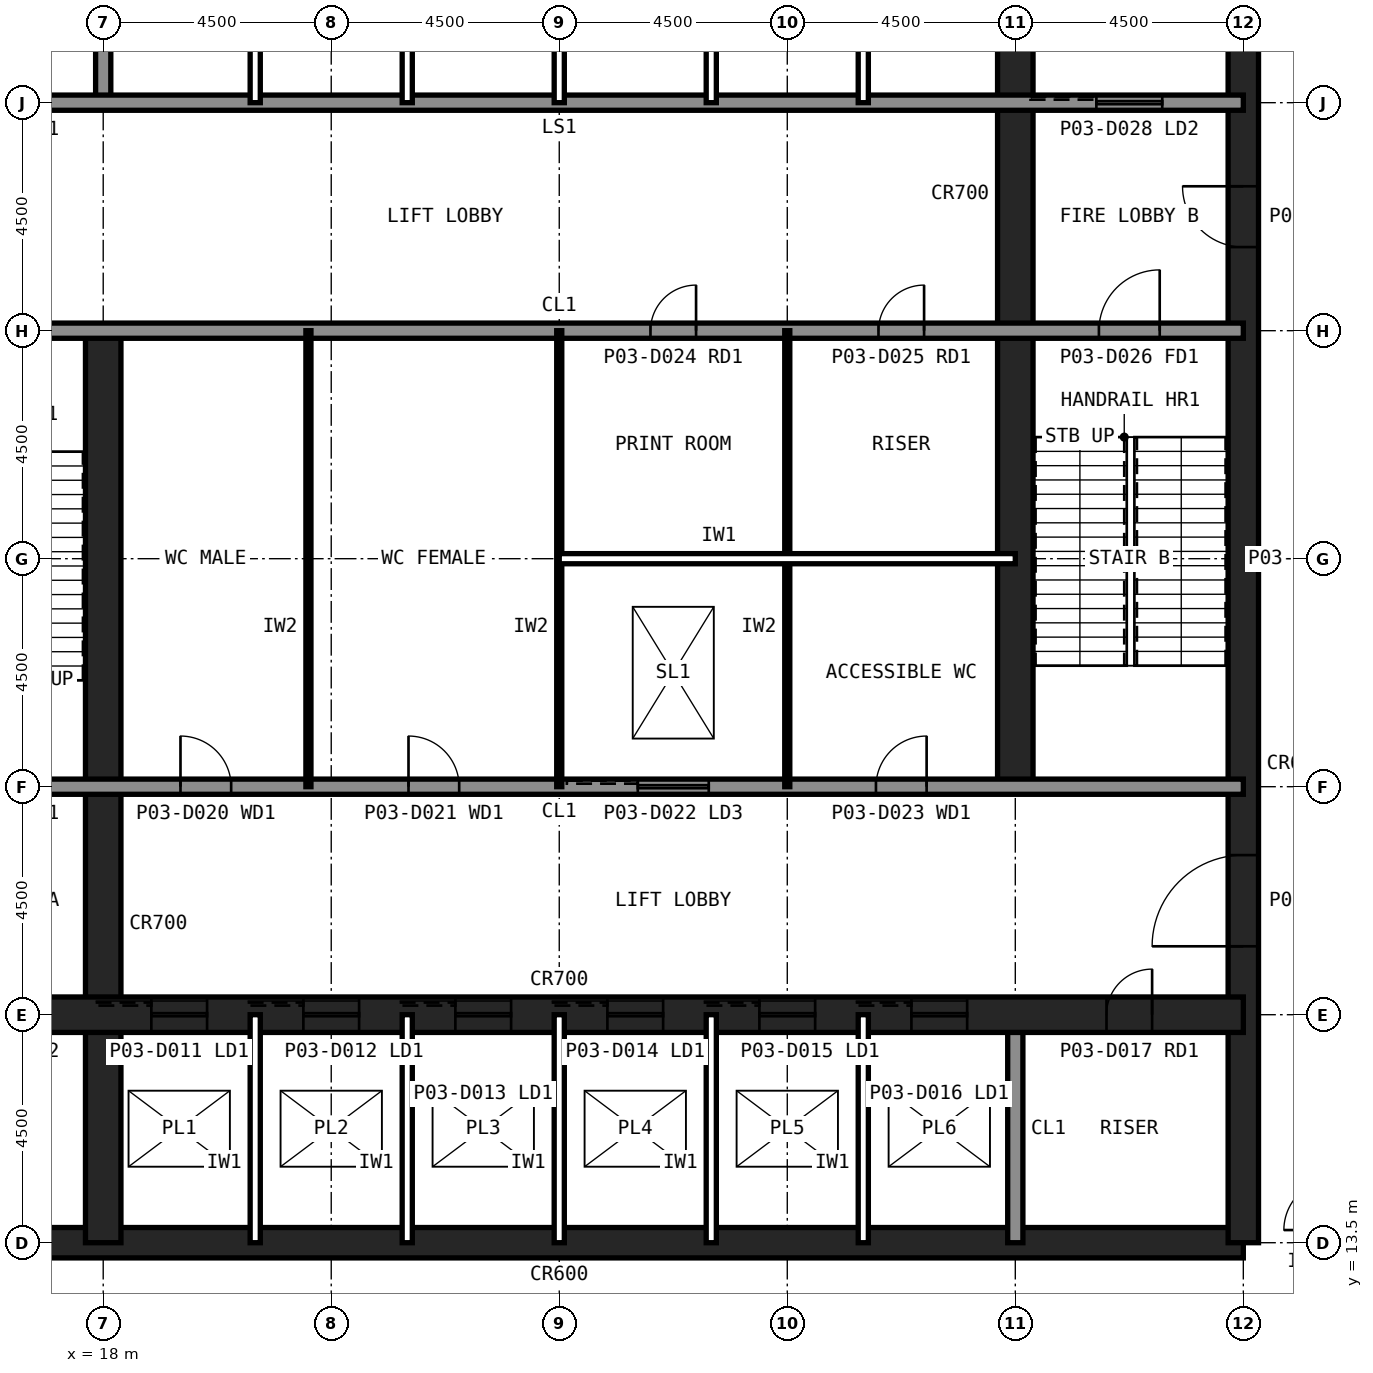
"""IFC4 building model, lengths in metres.
Left out: names, types, materials, properties, quantities, classifications, styles, units other than length and angle.
Written with IfcOpenShell. Run it as: python <this file> out.ifc"""

import sys

from ifc_helpers import new_model, si_unit, direction, frame, frame_2d, origin, place, context, subcontext, project, spatial, rectangle, extrude, element, fill, save


model = new_model("IFC4")
c1 = context("Model", 3, precision=1e-05, world=origin(), true_north=direction((0.0, 1.0)))
c2 = subcontext(c1, "Body", "Model", "MODEL_VIEW")
j1 = project(units=[si_unit("LENGTHUNIT", "METRE"), si_unit("PLANEANGLEUNIT", "RADIAN")], contexts=[c1])
p1 = place(None, origin())
s1 = spatial("IfcSite", under=j1, at=p1, CompositionType="ELEMENT")
p2 = place(p1, origin())
s2 = spatial("IfcBuilding", under=s1, at=p2, CompositionType="ELEMENT")
p3 = place(p2, frame((0.0, 0.0, 12.0)))
s3 = spatial("IfcBuildingStorey", under=s2, at=p3, CompositionType="ELEMENT", Elevation=12.0)
p4 = place(p3, frame((13.5, 13.5, 0.0), z_axis=(0.0, 0.0, 1.0), x_axis=(1.0, 0.0, 0.0)))
e1 = element("IfcWall", 1, at=p4, inside=s3, PredefinedType="SHEAR", context=c2, shape_type="SweptSolid", body=[
    extrude(rectangle(XDim=27.0, YDim=0.6, at=frame_2d((13.5, 0.0))), origin(), (0.0, 0.0, 1.0), 6.0),
])
p5 = place(p3, frame((40.5, 13.5, 0.0), z_axis=(0.0, 0.0, 1.0), x_axis=(0.0, 1.0, 0.0)))
e2 = element("IfcWall", 2, at=p5, inside=s3, PredefinedType="SHEAR", context=c2, shape_type="SweptSolid", body=[
    extrude(rectangle(XDim=27.0, YDim=0.6, at=frame_2d((13.5, 0.0))), origin(), (0.0, 0.0, 1.0), 6.0),
])
p6 = place(p5, frame((5.85, 0.0, 0.0)))
e3 = element("IfcOpeningElement", 3, at=p6, cuts=e2, PredefinedType="OPENING", context=c2, shape_type="SweptSolid", body=[
    extrude(rectangle(XDim=1.8, YDim=2.1, at=frame_2d((0.9, 1.05))), frame((0.0, 0.31, 0.0), z_axis=(0.0, -1.0, 0.0), x_axis=(1.0, 0.0, 0.0)), (0.0, 0.0, 1.0), 0.62),
])
p7 = place(p5, frame((19.65, 0.0, 0.0)))
e4 = element("IfcOpeningElement", 4, at=p7, cuts=e2, PredefinedType="OPENING", context=c2, shape_type="SweptSolid", body=[
    extrude(rectangle(XDim=1.2, YDim=2.1, at=frame_2d((0.6, 1.05))), frame((0.0, 0.31, 0.0), z_axis=(0.0, -1.0, 0.0), x_axis=(1.0, 0.0, 0.0)), (0.0, 0.0, 1.0), 0.62),
])
p8 = place(p3, frame((18.0, 13.5, 0.0), z_axis=(0.0, 0.0, 1.0), x_axis=(0.0, 1.0, 0.0)))
e5 = element("IfcWall", 5, at=p8, inside=s3, PredefinedType="SHEAR", context=c2, shape_type="SweptSolid", body=[
    extrude(rectangle(XDim=18.0, YDim=0.7, at=frame_2d((9.0, 0.0))), origin(), (0.0, 0.0, 1.0), 6.0),
])
for number, where, z_axis, x_axis in (
    (6, (18.0, 36.0, 0.0), (0.0, 0.0, 1.0), (0.0, 1.0, 0.0)),
    (7, (36.0, 13.5, 0.0), (0.0, 0.0, 1.0), (0.0, 1.0, 0.0)),
):
    element("IfcWall", number, at=place(p3, frame(where, z_axis=z_axis, x_axis=x_axis)), inside=s3, PredefinedType="SOLIDWALL", context=c2, shape_type="SweptSolid", body=[
        extrude(rectangle(XDim=4.5, YDim=0.3, at=frame_2d((2.25, 0.0))), origin(), (0.0, 0.0, 1.0), 5.8),
    ])
p9 = place(p3, frame((36.0, 22.5, 0.0), z_axis=(0.0, 0.0, 1.0), x_axis=(0.0, 1.0, 0.0)))
e8 = element("IfcWall", 8, at=p9, inside=s3, PredefinedType="SHEAR", context=c2, shape_type="SweptSolid", body=[
    extrude(rectangle(XDim=18.0, YDim=0.7, at=frame_2d((9.0, 0.0))), origin(), (0.0, 0.0, 1.0), 6.0),
])
p10 = place(p3, frame((13.5, 18.0, 0.0), z_axis=(0.0, 0.0, 1.0), x_axis=(1.0, 0.0, 0.0)))
e9 = element("IfcWall", 9, at=p10, inside=s3, PredefinedType="SHEAR", context=c2, shape_type="SweptSolid", body=[
    extrude(rectangle(XDim=27.0, YDim=0.7, at=frame_2d((13.5, 0.0))), origin(), (0.0, 0.0, 1.0), 6.0),
])
p11 = place(p10, frame((24.3, 0.0, 0.0)))
e10 = element("IfcOpeningElement", 10, at=p11, cuts=e9, PredefinedType="OPENING", context=c2, shape_type="SweptSolid", body=[
    extrude(rectangle(XDim=0.9, YDim=2.1, at=frame_2d((0.45, 1.05))), frame((0.0, 0.36, 0.0), z_axis=(0.0, -1.0, 0.0), x_axis=(1.0, 0.0, 0.0)), (0.0, 0.0, 1.0), 0.72),
])
p12 = place(p10, frame((5.45, 0.0, 0.0)))
e11 = element("IfcOpeningElement", 11, at=p12, cuts=e9, PredefinedType="OPENING", context=c2, shape_type="SweptSolid", body=[
    extrude(rectangle(XDim=1.1, YDim=2.1, at=frame_2d((0.55, 1.05))), frame((0.0, 0.36, 0.0), z_axis=(0.0, -1.0, 0.0), x_axis=(1.0, 0.0, 0.0)), (0.0, 0.0, 1.0), 0.72),
])
p13 = place(p10, frame((8.45, 0.0, 0.0)))
e12 = element("IfcOpeningElement", 12, at=p13, cuts=e9, PredefinedType="OPENING", context=c2, shape_type="SweptSolid", body=[
    extrude(rectangle(XDim=1.1, YDim=2.1, at=frame_2d((0.55, 1.05))), frame((0.0, 0.36, 0.0), z_axis=(0.0, -1.0, 0.0), x_axis=(1.0, 0.0, 0.0)), (0.0, 0.0, 1.0), 0.72),
])
p14 = place(p10, frame((11.45, 0.0, 0.0)))
e13 = element("IfcOpeningElement", 13, at=p14, cuts=e9, PredefinedType="OPENING", context=c2, shape_type="SweptSolid", body=[
    extrude(rectangle(XDim=1.1, YDim=2.1, at=frame_2d((0.55, 1.05))), frame((0.0, 0.36, 0.0), z_axis=(0.0, -1.0, 0.0), x_axis=(1.0, 0.0, 0.0)), (0.0, 0.0, 1.0), 0.72),
])
p15 = place(p10, frame((14.45, 0.0, 0.0)))
e14 = element("IfcOpeningElement", 14, at=p15, cuts=e9, PredefinedType="OPENING", context=c2, shape_type="SweptSolid", body=[
    extrude(rectangle(XDim=1.1, YDim=2.1, at=frame_2d((0.55, 1.05))), frame((0.0, 0.36, 0.0), z_axis=(0.0, -1.0, 0.0), x_axis=(1.0, 0.0, 0.0)), (0.0, 0.0, 1.0), 0.72),
])
p16 = place(p10, frame((17.45, 0.0, 0.0)))
e15 = element("IfcOpeningElement", 15, at=p16, cuts=e9, PredefinedType="OPENING", context=c2, shape_type="SweptSolid", body=[
    extrude(rectangle(XDim=1.1, YDim=2.1, at=frame_2d((0.55, 1.05))), frame((0.0, 0.36, 0.0), z_axis=(0.0, -1.0, 0.0), x_axis=(1.0, 0.0, 0.0)), (0.0, 0.0, 1.0), 0.72),
])
p17 = place(p10, frame((20.45, 0.0, 0.0)))
e16 = element("IfcOpeningElement", 16, at=p17, cuts=e9, PredefinedType="OPENING", context=c2, shape_type="SweptSolid", body=[
    extrude(rectangle(XDim=1.1, YDim=2.1, at=frame_2d((0.55, 1.05))), frame((0.0, 0.36, 0.0), z_axis=(0.0, -1.0, 0.0), x_axis=(1.0, 0.0, 0.0)), (0.0, 0.0, 1.0), 0.72),
])
p18 = place(p10, frame((1.6, 0.0, 0.0)))
e17 = element("IfcOpeningElement", 17, at=p18, cuts=e9, PredefinedType="OPENING", context=c2, shape_type="SweptSolid", body=[
    extrude(rectangle(XDim=1.3, YDim=2.2, at=frame_2d((0.65, 1.1))), frame((0.0, 0.36, 0.0), z_axis=(0.0, -1.0, 0.0), x_axis=(1.0, 0.0, 0.0)), (0.0, 0.0, 1.0), 0.72),
])
p19 = place(p3, frame((13.5, 36.0, 0.0), z_axis=(0.0, 0.0, 1.0), x_axis=(1.0, 0.0, 0.0)))
e18 = element("IfcWall", 18, at=p19, inside=s3, PredefinedType="SOLIDWALL", context=c2, shape_type="SweptSolid", body=[
    extrude(rectangle(XDim=27.0, YDim=0.3, at=frame_2d((13.5, 0.0))), origin(), (0.0, 0.0, 1.0), 5.8),
])
p20 = place(p19, frame((1.8, 0.0, 0.0)))
e19 = element("IfcOpeningElement", 19, at=p20, cuts=e18, PredefinedType="OPENING", context=c2, shape_type="SweptSolid", body=[
    extrude(rectangle(XDim=0.9, YDim=2.1, at=frame_2d((0.45, 1.05))), frame((0.0, 0.16, 0.0), z_axis=(0.0, -1.0, 0.0), x_axis=(1.0, 0.0, 0.0)), (0.0, 0.0, 1.0), 0.32),
])
p21 = place(p19, frame((24.1, 0.0, 0.0)))
e20 = element("IfcOpeningElement", 20, at=p21, cuts=e18, PredefinedType="OPENING", context=c2, shape_type="SweptSolid", body=[
    extrude(rectangle(XDim=1.3, YDim=2.2, at=frame_2d((0.65, 1.1))), frame((0.0, 0.16, 0.0), z_axis=(0.0, -1.0, 0.0), x_axis=(1.0, 0.0, 0.0)), (0.0, 0.0, 1.0), 0.32),
])
p22 = place(p3, frame((13.5, 22.5, 0.0), z_axis=(0.0, 0.0, 1.0), x_axis=(1.0, 0.0, 0.0)))
e21 = element("IfcWall", 21, at=p22, inside=s3, PredefinedType="SOLIDWALL", context=c2, shape_type="SweptSolid", body=[
    extrude(rectangle(XDim=27.0, YDim=0.3, at=frame_2d((13.5, 0.0))), origin(), (0.0, 0.0, 1.0), 5.8),
])
p23 = place(p22, frame((1.65, 0.0, 0.0)))
e22 = element("IfcOpeningElement", 22, at=p23, cuts=e21, PredefinedType="OPENING", context=c2, shape_type="SweptSolid", body=[
    extrude(rectangle(XDim=1.2, YDim=2.1, at=frame_2d((0.6, 1.05))), frame((0.0, 0.16, 0.0), z_axis=(0.0, -1.0, 0.0), x_axis=(1.0, 0.0, 0.0)), (0.0, 0.0, 1.0), 0.32),
])
p24 = place(p22, frame((6.025, 0.0, 0.0)))
e23 = element("IfcOpeningElement", 23, at=p24, cuts=e21, PredefinedType="OPENING", context=c2, shape_type="SweptSolid", body=[
    extrude(rectangle(XDim=1.0, YDim=2.1, at=frame_2d((0.5, 1.05))), frame((0.0, 0.16, 0.0), z_axis=(0.0, -1.0, 0.0), x_axis=(1.0, 0.0, 0.0)), (0.0, 0.0, 1.0), 0.32),
])
p25 = place(p22, frame((10.525, 0.0, 0.0)))
e24 = element("IfcOpeningElement", 24, at=p25, cuts=e21, PredefinedType="OPENING", context=c2, shape_type="SweptSolid", body=[
    extrude(rectangle(XDim=1.0, YDim=2.1, at=frame_2d((0.5, 1.05))), frame((0.0, 0.16, 0.0), z_axis=(0.0, -1.0, 0.0), x_axis=(1.0, 0.0, 0.0)), (0.0, 0.0, 1.0), 0.32),
])
p26 = place(p22, frame((19.75, 0.0, 0.0)))
e25 = element("IfcOpeningElement", 25, at=p26, cuts=e21, PredefinedType="OPENING", context=c2, shape_type="SweptSolid", body=[
    extrude(rectangle(XDim=1.0, YDim=2.1, at=frame_2d((0.5, 1.05))), frame((0.0, 0.16, 0.0), z_axis=(0.0, -1.0, 0.0), x_axis=(1.0, 0.0, 0.0)), (0.0, 0.0, 1.0), 0.32),
])
p27 = place(p22, frame((15.05, 0.0, 0.0)))
e26 = element("IfcOpeningElement", 26, at=p27, cuts=e21, PredefinedType="OPENING", context=c2, shape_type="SweptSolid", body=[
    extrude(rectangle(XDim=1.4, YDim=2.4, at=frame_2d((0.7, 1.2))), frame((0.0, 0.16, 0.0), z_axis=(0.0, -1.0, 0.0), x_axis=(1.0, 0.0, 0.0)), (0.0, 0.0, 1.0), 0.32),
])
p28 = place(p3, frame((13.5, 31.5, 0.0), z_axis=(0.0, 0.0, 1.0), x_axis=(1.0, 0.0, 0.0)))
e27 = element("IfcWall", 27, at=p28, inside=s3, PredefinedType="SOLIDWALL", context=c2, shape_type="SweptSolid", body=[
    extrude(rectangle(XDim=27.0, YDim=0.3, at=frame_2d((13.5, 0.0))), origin(), (0.0, 0.0, 1.0), 5.8),
])
p29 = place(p28, frame((24.15, 0.0, 0.0)))
e28 = element("IfcOpeningElement", 28, at=p29, cuts=e27, PredefinedType="OPENING", context=c2, shape_type="SweptSolid", body=[
    extrude(rectangle(XDim=1.2, YDim=2.1, at=frame_2d((0.6, 1.05))), frame((0.0, 0.16, 0.0), z_axis=(0.0, -1.0, 0.0), x_axis=(1.0, 0.0, 0.0)), (0.0, 0.0, 1.0), 0.32),
])
p30 = place(p28, frame((15.3, 0.0, 0.0)))
e29 = element("IfcOpeningElement", 29, at=p30, cuts=e27, PredefinedType="OPENING", context=c2, shape_type="SweptSolid", body=[
    extrude(rectangle(XDim=0.9, YDim=2.1, at=frame_2d((0.45, 1.05))), frame((0.0, 0.16, 0.0), z_axis=(0.0, -1.0, 0.0), x_axis=(1.0, 0.0, 0.0)), (0.0, 0.0, 1.0), 0.32),
])
p31 = place(p28, frame((19.8, 0.0, 0.0)))
e30 = element("IfcOpeningElement", 30, at=p31, cuts=e27, PredefinedType="OPENING", context=c2, shape_type="SweptSolid", body=[
    extrude(rectangle(XDim=0.9, YDim=2.1, at=frame_2d((0.45, 1.05))), frame((0.0, 0.16, 0.0), z_axis=(0.0, -1.0, 0.0), x_axis=(1.0, 0.0, 0.0)), (0.0, 0.0, 1.0), 0.32),
])
for number, where, z_axis, x_axis in (
    (31, (21.0, 13.5, 0.0), (0.0, 0.0, 1.0), (0.0, 1.0, 0.0)),
    (32, (21.0, 36.0, 0.0), (0.0, 0.0, 1.0), (0.0, 1.0, 0.0)),
    (33, (24.0, 13.5, 0.0), (0.0, 0.0, 1.0), (0.0, 1.0, 0.0)),
    (34, (24.0, 36.0, 0.0), (0.0, 0.0, 1.0), (0.0, 1.0, 0.0)),
    (35, (27.0, 13.5, 0.0), (0.0, 0.0, 1.0), (0.0, 1.0, 0.0)),
    (36, (27.0, 36.0, 0.0), (0.0, 0.0, 1.0), (0.0, 1.0, 0.0)),
    (37, (30.0, 13.5, 0.0), (0.0, 0.0, 1.0), (0.0, 1.0, 0.0)),
    (38, (30.0, 36.0, 0.0), (0.0, 0.0, 1.0), (0.0, 1.0, 0.0)),
    (39, (33.0, 13.5, 0.0), (0.0, 0.0, 1.0), (0.0, 1.0, 0.0)),
    (40, (33.0, 36.0, 0.0), (0.0, 0.0, 1.0), (0.0, 1.0, 0.0)),
):
    element("IfcWall", number, at=place(p3, frame(where, z_axis=z_axis, x_axis=x_axis)), inside=s3, PredefinedType="PARTITIONING", context=c2, shape_type="SweptSolid", body=[
        extrude(rectangle(XDim=4.5, YDim=0.2, at=frame_2d((2.25, 0.0))), origin(), (0.0, 0.0, 1.0), 5.8),
    ])
for number, where, z_axis, x_axis in (
    (41, (22.05, 22.5, 0.0), (0.0, 0.0, 1.0), (0.0, 1.0, 0.0)),
    (42, (27.0, 22.5, 0.0), (0.0, 0.0, 1.0), (0.0, 1.0, 0.0)),
    (43, (31.5, 22.5, 0.0), (0.0, 0.0, 1.0), (0.0, 1.0, 0.0)),
):
    element("IfcWall", number, at=place(p3, frame(where, z_axis=z_axis, x_axis=x_axis)), inside=s3, PredefinedType="PLUMBINGWALL", context=c2, shape_type="SweptSolid", body=[
        extrude(rectangle(XDim=9.0, YDim=0.1, at=frame_2d((4.5, 0.0))), origin(), (0.0, 0.0, 1.0), 5.8),
    ])
p32 = place(p3, frame((27.0, 27.0, 0.0), z_axis=(0.0, 0.0, 1.0), x_axis=(1.0, 0.0, 0.0)))
e44 = element("IfcWall", 44, at=p32, inside=s3, PredefinedType="PARTITIONING", context=c2, shape_type="SweptSolid", body=[
    extrude(rectangle(XDim=9.0, YDim=0.2, at=frame_2d((4.5, 0.0))), origin(), (0.0, 0.0, 1.0), 5.8),
])
p33 = place(p6, origin())
e45 = element("IfcDoor", 45, at=p33, inside=s3, OperationType="SINGLE_SWING_LEFT", PredefinedType="DOOR", context=c2, shape_type="SweptSolid", body=[
    extrude(rectangle(XDim=1.8, YDim=2.1, at=frame_2d((0.9, 1.05))), frame((0.0, 0.025, 0.0), z_axis=(0.0, -1.0, 0.0), x_axis=(1.0, 0.0, 0.0)), (0.0, 0.0, 1.0), 0.05),
])
fill(e3, e45)
p34 = place(p7, origin())
e46 = element("IfcDoor", 46, at=p34, inside=s3, OperationType="SINGLE_SWING_RIGHT", PredefinedType="DOOR", context=c2, shape_type="SweptSolid", body=[
    extrude(rectangle(XDim=1.2, YDim=2.1, at=frame_2d((0.6, 1.05))), frame((0.0, 0.025, 0.0), z_axis=(0.0, -1.0, 0.0), x_axis=(1.0, 0.0, 0.0)), (0.0, 0.0, 1.0), 0.05),
])
fill(e4, e46)
p35 = place(p29, origin())
e47 = element("IfcDoor", 47, at=p35, inside=s3, OperationType="SINGLE_SWING_RIGHT", PredefinedType="DOOR", context=c2, shape_type="SweptSolid", body=[
    extrude(rectangle(XDim=1.2, YDim=2.1, at=frame_2d((0.6, 1.05))), frame((0.0, 0.025, 0.0), z_axis=(0.0, -1.0, 0.0), x_axis=(1.0, 0.0, 0.0)), (0.0, 0.0, 1.0), 0.05),
])
fill(e28, e47)
p36 = place(p24, origin())
e48 = element("IfcDoor", 48, at=p36, inside=s3, OperationType="SINGLE_SWING_LEFT", PredefinedType="DOOR", context=c2, shape_type="SweptSolid", body=[
    extrude(rectangle(XDim=1.0, YDim=2.1, at=frame_2d((0.5, 1.05))), frame((0.0, 0.025, 0.0), z_axis=(0.0, -1.0, 0.0), x_axis=(1.0, 0.0, 0.0)), (0.0, 0.0, 1.0), 0.05),
])
fill(e23, e48)
p37 = place(p25, origin())
e49 = element("IfcDoor", 49, at=p37, inside=s3, OperationType="SINGLE_SWING_LEFT", PredefinedType="DOOR", context=c2, shape_type="SweptSolid", body=[
    extrude(rectangle(XDim=1.0, YDim=2.1, at=frame_2d((0.5, 1.05))), frame((0.0, 0.025, 0.0), z_axis=(0.0, -1.0, 0.0), x_axis=(1.0, 0.0, 0.0)), (0.0, 0.0, 1.0), 0.05),
])
fill(e24, e49)
p38 = place(p26, origin())
e50 = element("IfcDoor", 50, at=p38, inside=s3, OperationType="SINGLE_SWING_RIGHT", PredefinedType="DOOR", context=c2, shape_type="SweptSolid", body=[
    extrude(rectangle(XDim=1.0, YDim=2.1, at=frame_2d((0.5, 1.05))), frame((0.0, 0.025, 0.0), z_axis=(0.0, -1.0, 0.0), x_axis=(1.0, 0.0, 0.0)), (0.0, 0.0, 1.0), 0.05),
])
fill(e25, e50)
p39 = place(p30, origin())
e51 = element("IfcDoor", 51, at=p39, inside=s3, OperationType="SINGLE_SWING_RIGHT", PredefinedType="DOOR", context=c2, shape_type="SweptSolid", body=[
    extrude(rectangle(XDim=0.9, YDim=2.1, at=frame_2d((0.45, 1.05))), frame((0.0, 0.025, 0.0), z_axis=(0.0, -1.0, 0.0), x_axis=(1.0, 0.0, 0.0)), (0.0, 0.0, 1.0), 0.05),
])
fill(e29, e51)
p40 = place(p31, origin())
e52 = element("IfcDoor", 52, at=p40, inside=s3, OperationType="SINGLE_SWING_RIGHT", PredefinedType="DOOR", context=c2, shape_type="SweptSolid", body=[
    extrude(rectangle(XDim=0.9, YDim=2.1, at=frame_2d((0.45, 1.05))), frame((0.0, 0.025, 0.0), z_axis=(0.0, -1.0, 0.0), x_axis=(1.0, 0.0, 0.0)), (0.0, 0.0, 1.0), 0.05),
])
fill(e30, e52)
p41 = place(p11, origin())
e53 = element("IfcDoor", 53, at=p41, inside=s3, OperationType="SINGLE_SWING_RIGHT", PredefinedType="DOOR", context=c2, shape_type="SweptSolid", body=[
    extrude(rectangle(XDim=0.9, YDim=2.1, at=frame_2d((0.45, 1.05))), frame((0.0, 0.025, 0.0), z_axis=(0.0, -1.0, 0.0), x_axis=(1.0, 0.0, 0.0)), (0.0, 0.0, 1.0), 0.05),
])
fill(e10, e53)
p42 = place(p12, origin())
e54 = element("IfcDoor", 54, at=p42, inside=s3, OperationType="SLIDING_TO_LEFT", PredefinedType="DOOR", context=c2, shape_type="SweptSolid", body=[
    extrude(rectangle(XDim=1.1, YDim=2.1, at=frame_2d((0.55, 1.05))), frame((0.0, 0.025, 0.0), z_axis=(0.0, -1.0, 0.0), x_axis=(1.0, 0.0, 0.0)), (0.0, 0.0, 1.0), 0.05),
])
fill(e11, e54)
p43 = place(p13, origin())
e55 = element("IfcDoor", 55, at=p43, inside=s3, OperationType="SLIDING_TO_LEFT", PredefinedType="DOOR", context=c2, shape_type="SweptSolid", body=[
    extrude(rectangle(XDim=1.1, YDim=2.1, at=frame_2d((0.55, 1.05))), frame((0.0, 0.025, 0.0), z_axis=(0.0, -1.0, 0.0), x_axis=(1.0, 0.0, 0.0)), (0.0, 0.0, 1.0), 0.05),
])
fill(e12, e55)
p44 = place(p14, origin())
e56 = element("IfcDoor", 56, at=p44, inside=s3, OperationType="SLIDING_TO_LEFT", PredefinedType="DOOR", context=c2, shape_type="SweptSolid", body=[
    extrude(rectangle(XDim=1.1, YDim=2.1, at=frame_2d((0.55, 1.05))), frame((0.0, 0.025, 0.0), z_axis=(0.0, -1.0, 0.0), x_axis=(1.0, 0.0, 0.0)), (0.0, 0.0, 1.0), 0.05),
])
fill(e13, e56)
p45 = place(p15, origin())
e57 = element("IfcDoor", 57, at=p45, inside=s3, OperationType="SLIDING_TO_LEFT", PredefinedType="DOOR", context=c2, shape_type="SweptSolid", body=[
    extrude(rectangle(XDim=1.1, YDim=2.1, at=frame_2d((0.55, 1.05))), frame((0.0, 0.025, 0.0), z_axis=(0.0, -1.0, 0.0), x_axis=(1.0, 0.0, 0.0)), (0.0, 0.0, 1.0), 0.05),
])
fill(e14, e57)
p46 = place(p16, origin())
e58 = element("IfcDoor", 58, at=p46, inside=s3, OperationType="SLIDING_TO_LEFT", PredefinedType="DOOR", context=c2, shape_type="SweptSolid", body=[
    extrude(rectangle(XDim=1.1, YDim=2.1, at=frame_2d((0.55, 1.05))), frame((0.0, 0.025, 0.0), z_axis=(0.0, -1.0, 0.0), x_axis=(1.0, 0.0, 0.0)), (0.0, 0.0, 1.0), 0.05),
])
fill(e15, e58)
p47 = place(p17, origin())
e59 = element("IfcDoor", 59, at=p47, inside=s3, OperationType="SLIDING_TO_LEFT", PredefinedType="DOOR", context=c2, shape_type="SweptSolid", body=[
    extrude(rectangle(XDim=1.1, YDim=2.1, at=frame_2d((0.55, 1.05))), frame((0.0, 0.025, 0.0), z_axis=(0.0, -1.0, 0.0), x_axis=(1.0, 0.0, 0.0)), (0.0, 0.0, 1.0), 0.05),
])
fill(e16, e59)
p48 = place(p21, origin())
e60 = element("IfcDoor", 60, at=p48, inside=s3, OperationType="SLIDING_TO_LEFT", PredefinedType="DOOR", context=c2, shape_type="SweptSolid", body=[
    extrude(rectangle(XDim=1.3, YDim=2.2, at=frame_2d((0.65, 1.1))), frame((0.0, 0.025, 0.0), z_axis=(0.0, -1.0, 0.0), x_axis=(1.0, 0.0, 0.0)), (0.0, 0.0, 1.0), 0.05),
])
fill(e20, e60)
p49 = place(p27, origin())
e61 = element("IfcDoor", 61, at=p49, inside=s3, OperationType="SLIDING_TO_LEFT", PredefinedType="DOOR", context=c2, shape_type="SweptSolid", body=[
    extrude(rectangle(XDim=1.4, YDim=2.4, at=frame_2d((0.7, 1.2))), frame((0.0, 0.025, 0.0), z_axis=(0.0, -1.0, 0.0), x_axis=(1.0, 0.0, 0.0)), (0.0, 0.0, 1.0), 0.05),
])
fill(e26, e61)
save(model, sys.argv[1])
